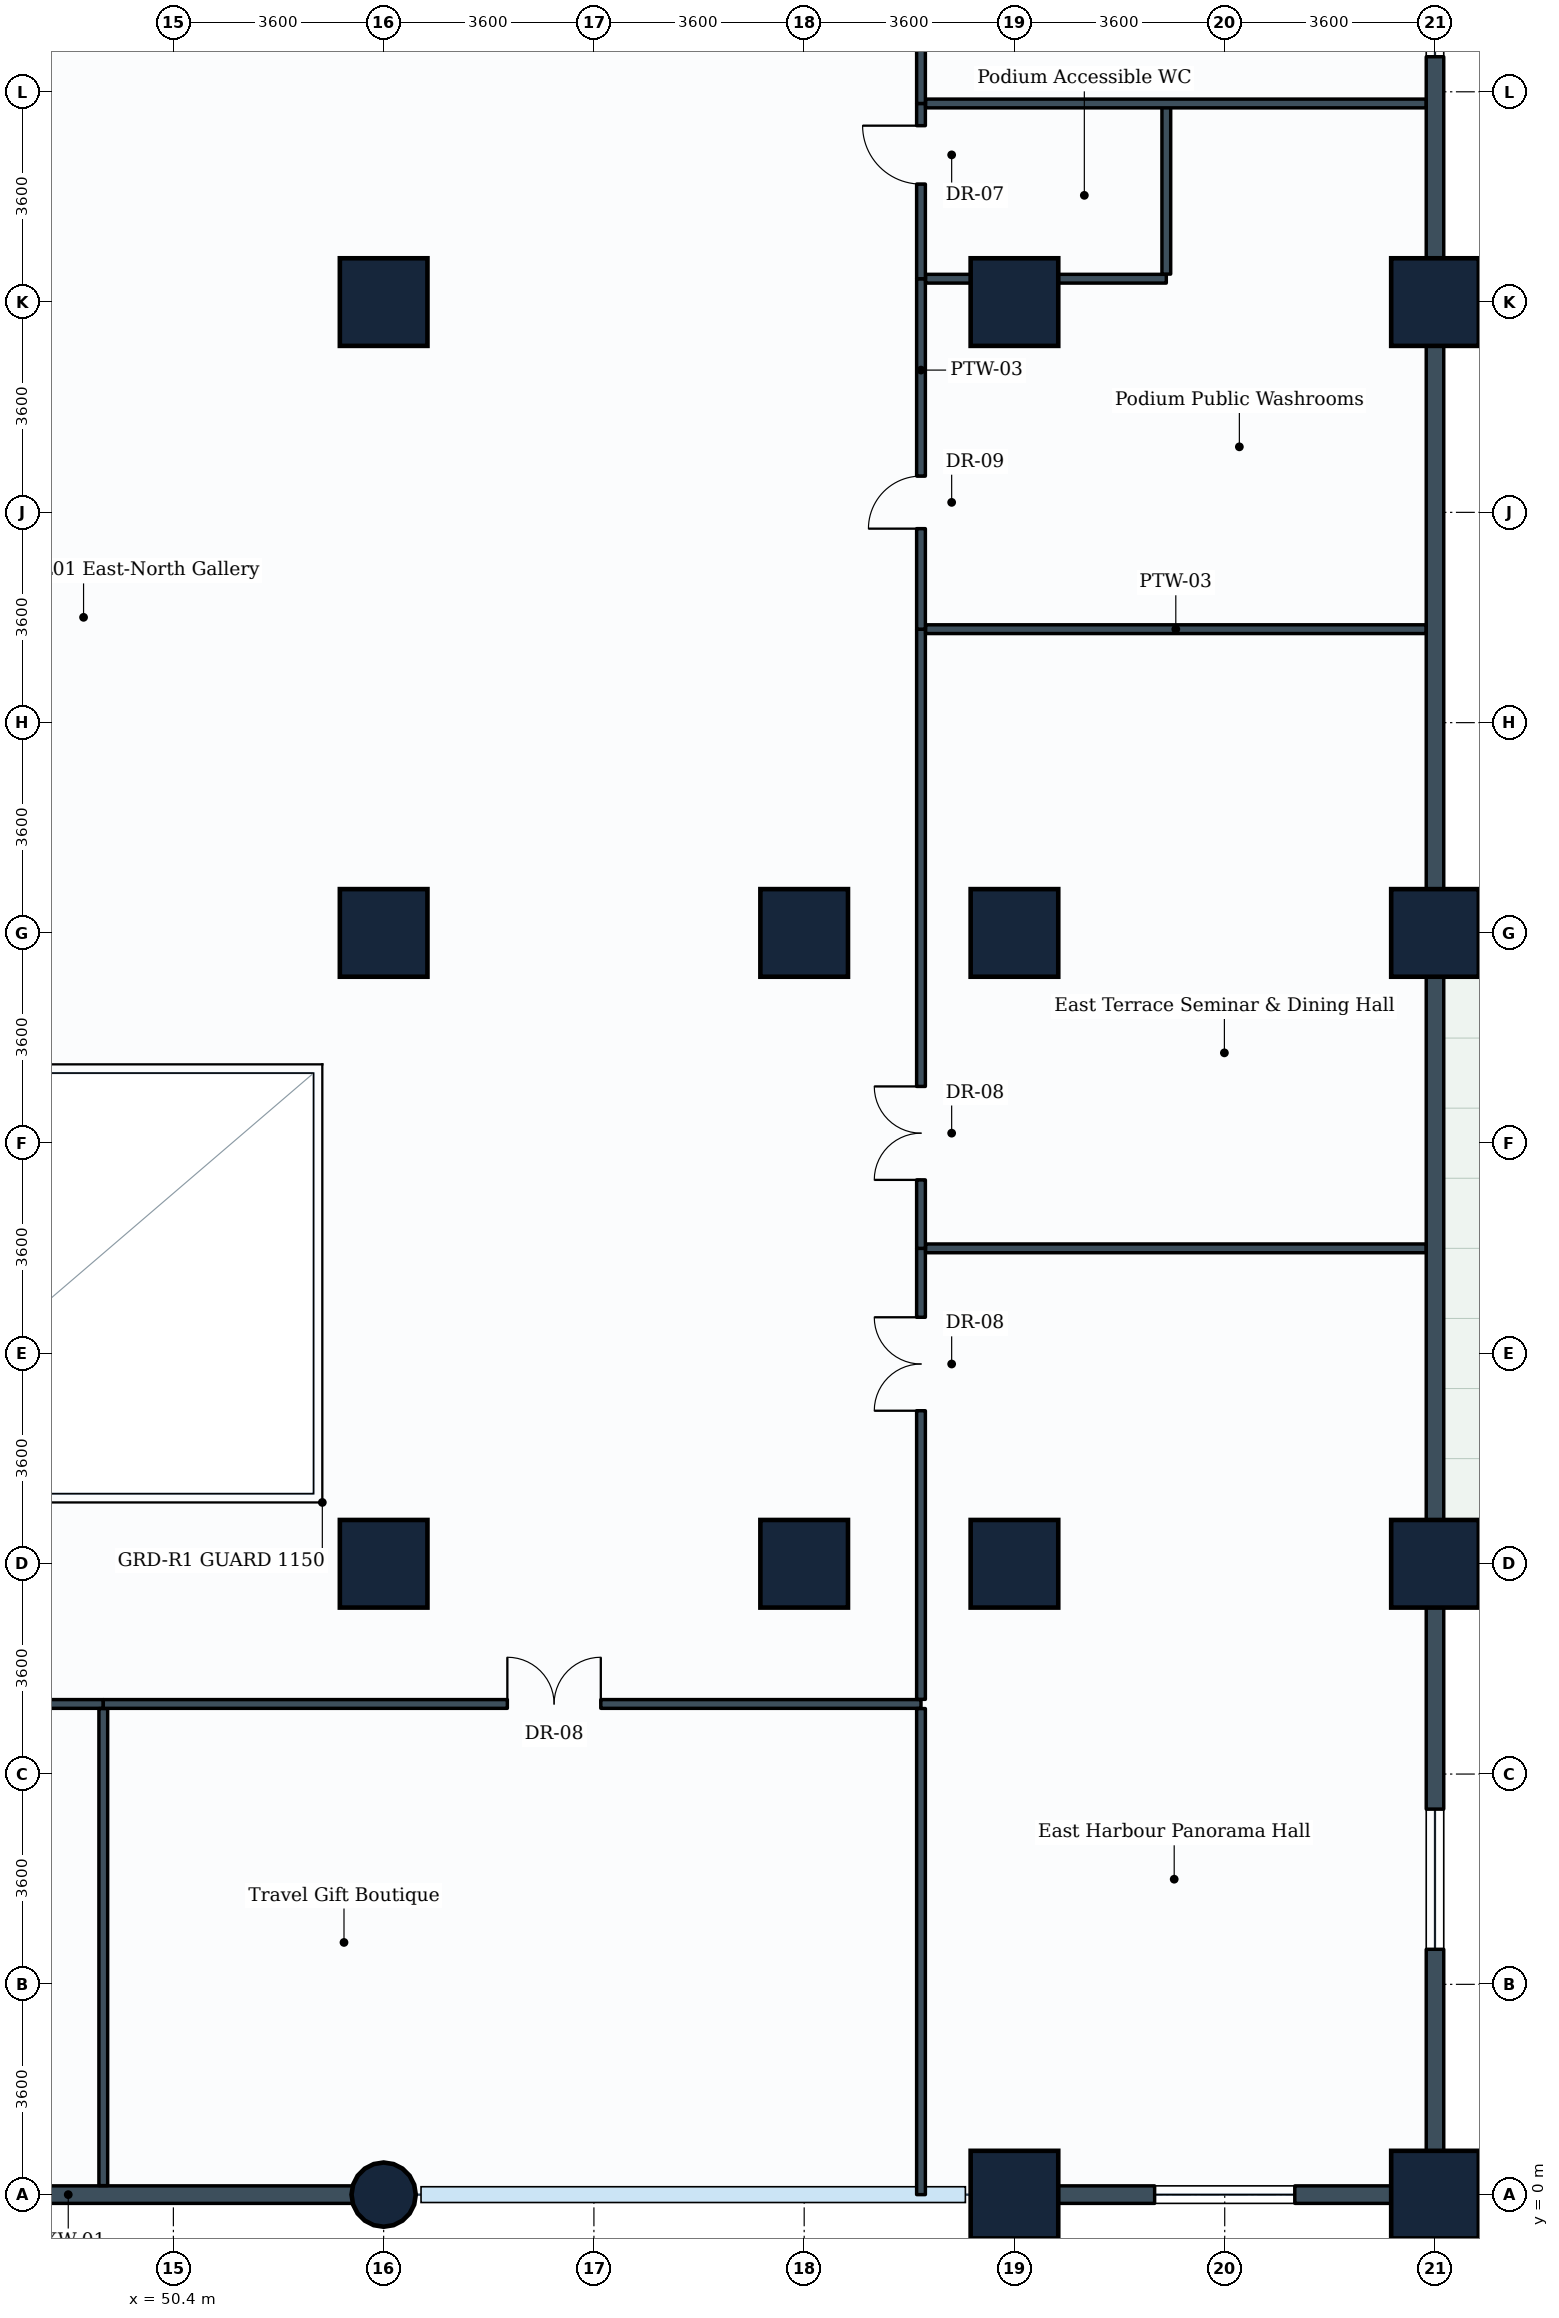
"""IFC4 building model, lengths in metres.
Left out: names, types, materials, properties, quantities, classifications, styles, units other than length and angle.
Written with IfcOpenShell. Run it as: python <this file> out.ifc"""

import sys

from ifc_helpers import new_model, si_unit, direction, frame, frame_2d, origin, origin_2d, place, context, subcontext, project, spatial, rectangle, circle, extrude, element, fill, save


model = new_model("IFC4")
c1 = context("Model", 3, precision=1e-05, world=origin(), true_north=direction((0.0, 1.0)))
c2 = subcontext(c1, "Body", "Model", "MODEL_VIEW")
j1 = project(units=[si_unit("LENGTHUNIT", "METRE"), si_unit("PLANEANGLEUNIT", "RADIAN")], contexts=[c1])
p1 = place(None, origin())
s1 = spatial("IfcSite", under=j1, at=p1, CompositionType="ELEMENT")
p2 = place(p1, origin())
s2 = spatial("IfcBuilding", under=s1, at=p2, CompositionType="ELEMENT")
p3 = place(p2, frame((0.0, 0.0, 5.4)))
s3 = spatial("IfcBuildingStorey", under=s2, at=p3, CompositionType="ELEMENT", Elevation=5.4)
p4 = place(p3, frame((54.0, 0.0, 0.0), z_axis=(0.0, 0.0, 1.0), x_axis=(1.0, 0.0, 0.0)))
e1 = element("IfcColumn", 1, at=p4, inside=s3, PredefinedType="COLUMN", context=c2, shape_type="SweptSolid", body=[
    extrude(circle(Radius=0.55, at=origin_2d()), origin(), (0.0, 0.0, 1.0), 4.8),
])
for number, where, z_axis, x_axis in (
    (2, (54.0, 10.8, 0.0), (0.0, 0.0, 1.0), (1.0, 0.0, 0.0)),
    (3, (54.0, 21.6, 0.0), (0.0, 0.0, 1.0), (1.0, 0.0, 0.0)),
    (4, (54.0, 32.4, 0.0), (0.0, 0.0, 1.0), (1.0, 0.0, 0.0)),
    (5, (61.2, 10.8, 0.0), (0.0, 0.0, 1.0), (1.0, 0.0, 0.0)),
    (6, (61.2, 21.6, 0.0), (0.0, 0.0, 1.0), (1.0, 0.0, 0.0)),
    (7, (64.8, 0.0, 0.0), (0.0, 0.0, 1.0), (1.0, 0.0, 0.0)),
    (8, (64.8, 10.8, 0.0), (0.0, 0.0, 1.0), (1.0, 0.0, 0.0)),
    (9, (64.8, 21.6, 0.0), (0.0, 0.0, 1.0), (1.0, 0.0, 0.0)),
    (10, (64.8, 32.4, 0.0), (0.0, 0.0, 1.0), (1.0, 0.0, 0.0)),
    (11, (72.0, 0.0, 0.0), (0.0, 0.0, 1.0), (1.0, 0.0, 0.0)),
    (12, (72.0, 10.8, 0.0), (0.0, 0.0, 1.0), (1.0, 0.0, 0.0)),
    (13, (72.0, 21.6, 0.0), (0.0, 0.0, 1.0), (1.0, 0.0, 0.0)),
    (14, (72.0, 32.4, 0.0), (0.0, 0.0, 1.0), (1.0, 0.0, 0.0)),
):
    element("IfcColumn", number, at=place(p3, frame(where, z_axis=z_axis, x_axis=x_axis)), inside=s3, PredefinedType="COLUMN", context=c2, shape_type="SweptSolid", body=[
        extrude(rectangle(XDim=1.5, YDim=1.5, at=origin_2d()), origin(), (0.0, 0.0, 1.0), 4.8),
    ])
p5 = place(p3, frame((54.0, 0.0, 0.0), z_axis=(0.0, 0.0, 1.0), x_axis=(-1.0, 0.0, 0.0)))
e15 = element("IfcWall", 15, at=p5, inside=s3, PredefinedType="STANDARD", context=c2, shape_type="SweptSolid", body=[
    extrude(rectangle(XDim=10.8, YDim=0.3, at=frame_2d((5.4, 0.0))), origin(), (0.0, 0.0, 1.0), 3.83),
])
p6 = place(p3, frame((72.0, 0.0, 0.0), z_axis=(0.0, 0.0, 1.0), x_axis=(-1.0, 0.0, 0.0)))
e16 = element("IfcWall", 16, at=p6, inside=s3, PredefinedType="STANDARD", context=c2, shape_type="SweptSolid", body=[
    extrude(rectangle(XDim=7.2, YDim=0.3, at=frame_2d((3.6, 0.0))), origin(), (0.0, 0.0, 1.0), 3.83),
])
p7 = place(p6, frame((2.4, 0.0, 0.85)))
e17 = element("IfcOpeningElement", 17, at=p7, cuts=e16, PredefinedType="OPENING", context=c2, shape_type="SweptSolid", body=[
    extrude(rectangle(XDim=2.4, YDim=1.6, at=frame_2d((1.2, 0.8))), frame((0.0, 0.16, 0.0), z_axis=(0.0, -1.0, 0.0), x_axis=(1.0, 0.0, 0.0)), (0.0, 0.0, 1.0), 0.32),
])
p8 = place(p3, frame((72.0, 10.8, 0.0), z_axis=(0.0, 0.0, 1.0), x_axis=(0.0, -1.0, 0.0)))
e18 = element("IfcWall", 18, at=p8, inside=s3, PredefinedType="STANDARD", context=c2, shape_type="SweptSolid", body=[
    extrude(rectangle(XDim=10.8, YDim=0.3, at=frame_2d((5.4, 0.0))), origin(), (0.0, 0.0, 1.0), 3.83),
])
p9 = place(p8, frame((4.2, 0.0, 0.85)))
e19 = element("IfcOpeningElement", 19, at=p9, cuts=e18, PredefinedType="OPENING", context=c2, shape_type="SweptSolid", body=[
    extrude(rectangle(XDim=2.4, YDim=1.6, at=frame_2d((1.2, 0.8))), frame((0.0, 0.16, 0.0), z_axis=(0.0, -1.0, 0.0), x_axis=(1.0, 0.0, 0.0)), (0.0, 0.0, 1.0), 0.32),
])
p10 = place(p3, frame((72.0, 21.6, 0.0), z_axis=(0.0, 0.0, 1.0), x_axis=(0.0, -1.0, 0.0)))
e20 = element("IfcWall", 20, at=p10, inside=s3, PredefinedType="STANDARD", context=c2, shape_type="SweptSolid", body=[
    extrude(rectangle(XDim=10.8, YDim=0.3, at=frame_2d((5.4, 0.0))), origin(), (0.0, 0.0, 1.0), 3.83),
])
p11 = place(p3, frame((72.0, 32.4, 0.0), z_axis=(0.0, 0.0, 1.0), x_axis=(0.0, -1.0, 0.0)))
e21 = element("IfcWall", 21, at=p11, inside=s3, PredefinedType="STANDARD", context=c2, shape_type="SweptSolid", body=[
    extrude(rectangle(XDim=10.8, YDim=0.3, at=frame_2d((5.4, 0.0))), origin(), (0.0, 0.0, 1.0), 3.83),
])
p12 = place(p3, frame((72.0, 43.2, 0.0), z_axis=(0.0, 0.0, 1.0), x_axis=(0.0, -1.0, 0.0)))
e22 = element("IfcWall", 22, at=p12, inside=s3, PredefinedType="STANDARD", context=c2, shape_type="SweptSolid", body=[
    extrude(rectangle(XDim=10.8, YDim=0.3, at=frame_2d((5.4, 0.0))), origin(), (0.0, 0.0, 1.0), 3.83),
])
p13 = place(p12, frame((4.2, 0.0, 0.85)))
e23 = element("IfcOpeningElement", 23, at=p13, cuts=e22, PredefinedType="OPENING", context=c2, shape_type="SweptSolid", body=[
    extrude(rectangle(XDim=2.4, YDim=1.6, at=frame_2d((1.2, 0.8))), frame((0.0, 0.16, 0.0), z_axis=(0.0, -1.0, 0.0), x_axis=(1.0, 0.0, 0.0)), (0.0, 0.0, 1.0), 0.32),
])
p14 = place(p3, frame((36.0, 8.4, 0.0), z_axis=(0.0, 0.0, 1.0), x_axis=(1.0, 0.0, 0.0)))
e24 = element("IfcWall", 24, at=p14, inside=s3, PredefinedType="PARTITIONING", context=c2, shape_type="SweptSolid", body=[
    extrude(rectangle(XDim=13.2, YDim=0.15, at=frame_2d((6.6, 0.0))), origin(), (0.0, 0.0, 1.0), 3.83),
])
p15 = place(p14, frame((3.409, 0.0, 0.0)))
e25 = element("IfcOpeningElement", 25, at=p15, cuts=e24, PredefinedType="OPENING", context=c2, shape_type="SweptSolid", body=[
    extrude(rectangle(XDim=1.6, YDim=2.2, at=frame_2d((0.8, 1.1))), frame((0.0, 0.085, 0.0), z_axis=(0.0, -1.0, 0.0), x_axis=(1.0, 0.0, 0.0)), (0.0, 0.0, 1.0), 0.17),
])
p16 = place(p3, frame((49.2, 0.154, 0.0), z_axis=(0.0, 0.0, 1.0), x_axis=(0.0, 1.0, 0.0)))
e26 = element("IfcWall", 26, at=p16, inside=s3, PredefinedType="PARTITIONING", context=c2, shape_type="SweptSolid", body=[
    extrude(rectangle(XDim=8.167, YDim=0.15, at=frame_2d((4.083, 0.0))), origin(), (0.0, 0.0, 1.0), 4.485),
])
p17 = place(p3, frame((49.2, 8.4, 0.0), z_axis=(0.0, 0.0, 1.0), x_axis=(1.0, 0.0, 0.0)))
e27 = element("IfcWall", 27, at=p17, inside=s3, PredefinedType="PARTITIONING", context=c2, shape_type="SweptSolid", body=[
    extrude(rectangle(XDim=14.0, YDim=0.15, at=frame_2d((7.0, 0.0))), origin(), (0.0, 0.0, 1.0), 3.83),
])
p18 = place(p17, frame((6.918, 0.0, 0.0)))
e28 = element("IfcOpeningElement", 28, at=p18, cuts=e27, PredefinedType="OPENING", context=c2, shape_type="SweptSolid", body=[
    extrude(rectangle(XDim=1.6, YDim=2.2, at=frame_2d((0.8, 1.1))), frame((0.0, 0.085, 0.0), z_axis=(0.0, -1.0, 0.0), x_axis=(1.0, 0.0, 0.0)), (0.0, 0.0, 1.0), 0.17),
])
p19 = place(p3, frame((63.2, 0.0, 0.0), z_axis=(0.0, 0.0, 1.0), x_axis=(0.0, 1.0, 0.0)))
e29 = element("IfcWall", 29, at=p19, inside=s3, PredefinedType="PARTITIONING", context=c2, shape_type="SweptSolid", body=[
    extrude(rectangle(XDim=8.321, YDim=0.15, at=frame_2d((4.161, 0.0))), origin(), (0.0, 0.0, 1.0), 3.83),
])
p20 = place(p3, frame((63.2, 8.479, 0.0), z_axis=(0.0, 0.0, 1.0), x_axis=(0.0, 1.0, 0.0)))
e30 = element("IfcWall", 30, at=p20, inside=s3, PredefinedType="PARTITIONING", context=c2, shape_type="SweptSolid", body=[
    extrude(rectangle(XDim=7.721, YDim=0.15, at=frame_2d((3.86, 0.0))), origin(), (0.0, 0.0, 1.0), 3.83),
])
p21 = place(p20, frame((4.941, 0.0, 0.0)))
e31 = element("IfcOpeningElement", 31, at=p21, cuts=e30, PredefinedType="OPENING", context=c2, shape_type="SweptSolid", body=[
    extrude(rectangle(XDim=1.6, YDim=2.2, at=frame_2d((0.8, 1.1))), frame((0.0, 0.085, 0.0), z_axis=(0.0, -1.0, 0.0), x_axis=(1.0, 0.0, 0.0)), (0.0, 0.0, 1.0), 0.17),
])
p22 = place(p3, frame((63.279, 16.2, 0.0), z_axis=(0.0, 0.0, 1.0), x_axis=(1.0, 0.0, 0.0)))
e32 = element("IfcWall", 32, at=p22, inside=s3, PredefinedType="PARTITIONING", context=c2, shape_type="SweptSolid", body=[
    extrude(rectangle(XDim=8.567, YDim=0.15, at=frame_2d((4.283, 0.0))), origin(), (0.0, 0.0, 1.0), 3.83),
])
p23 = place(p3, frame((63.2, 16.2, 0.0), z_axis=(0.0, 0.0, 1.0), x_axis=(0.0, 1.0, 0.0)))
e33 = element("IfcWall", 33, at=p23, inside=s3, PredefinedType="PARTITIONING", context=c2, shape_type="SweptSolid", body=[
    extrude(rectangle(XDim=10.6, YDim=0.15, at=frame_2d((5.3, 0.0))), origin(), (0.0, 0.0, 1.0), 3.83),
])
p24 = place(p23, frame((1.172, 0.0, 0.0)))
e34 = element("IfcOpeningElement", 34, at=p24, cuts=e33, PredefinedType="OPENING", context=c2, shape_type="SweptSolid", body=[
    extrude(rectangle(XDim=1.6, YDim=2.2, at=frame_2d((0.8, 1.1))), frame((0.0, 0.085, 0.0), z_axis=(0.0, -1.0, 0.0), x_axis=(1.0, 0.0, 0.0)), (0.0, 0.0, 1.0), 0.17),
])
p25 = place(p3, frame((63.279, 26.8, 0.0), z_axis=(0.0, 0.0, 1.0), x_axis=(1.0, 0.0, 0.0)))
e35 = element("IfcWall", 35, at=p25, inside=s3, PredefinedType="PARTITIONING", context=c2, shape_type="SweptSolid", body=[
    extrude(rectangle(XDim=8.567, YDim=0.15, at=frame_2d((4.283, 0.0))), origin(), (0.0, 0.0, 1.0), 3.83),
])
p26 = place(p3, frame((63.2, 26.8, 0.0), z_axis=(0.0, 0.0, 1.0), x_axis=(0.0, 1.0, 0.0)))
e36 = element("IfcWall", 36, at=p26, inside=s3, PredefinedType="PARTITIONING", context=c2, shape_type="SweptSolid", body=[
    extrude(rectangle(XDim=6.0, YDim=0.15, at=frame_2d((3.0, 0.0))), origin(), (0.0, 0.0, 1.0), 3.83),
])
p27 = place(p26, frame((1.721, 0.0, 0.0)))
e37 = element("IfcOpeningElement", 37, at=p27, cuts=e36, PredefinedType="OPENING", context=c2, shape_type="SweptSolid", body=[
    extrude(rectangle(XDim=0.9, YDim=2.1, at=frame_2d((0.45, 1.05))), frame((0.0, 0.085, 0.0), z_axis=(0.0, -1.0, 0.0), x_axis=(1.0, 0.0, 0.0)), (0.0, 0.0, 1.0), 0.17),
])
p28 = place(p3, frame((63.279, 32.8, 0.0), z_axis=(0.0, 0.0, 1.0), x_axis=(1.0, 0.0, 0.0)))
e38 = element("IfcWall", 38, at=p28, inside=s3, PredefinedType="PARTITIONING", context=c2, shape_type="SweptSolid", body=[
    extrude(rectangle(XDim=4.121, YDim=0.15, at=frame_2d((2.061, 0.0))), origin(), (0.0, 0.0, 1.0), 3.83),
])
p29 = place(p3, frame((67.4, 32.879, 0.0), z_axis=(0.0, 0.0, 1.0), x_axis=(0.0, 1.0, 0.0)))
e39 = element("IfcWall", 39, at=p29, inside=s3, PredefinedType="PARTITIONING", context=c2, shape_type="SweptSolid", body=[
    extrude(rectangle(XDim=2.921, YDim=0.15, at=frame_2d((1.46, 0.0))), origin(), (0.0, 0.0, 1.0), 4.485),
])
p30 = place(p3, frame((63.2, 32.8, 0.0), z_axis=(0.0, 0.0, 1.0), x_axis=(0.0, 1.0, 0.0)))
e40 = element("IfcWall", 40, at=p30, inside=s3, PredefinedType="PARTITIONING", context=c2, shape_type="SweptSolid", body=[
    extrude(rectangle(XDim=3.0, YDim=0.15, at=frame_2d((1.5, 0.0))), origin(), (0.0, 0.0, 1.0), 4.485),
])
p31 = place(p30, frame((1.62, 0.0, 0.0)))
e41 = element("IfcOpeningElement", 41, at=p31, cuts=e40, PredefinedType="OPENING", context=c2, shape_type="SweptSolid", body=[
    extrude(rectangle(XDim=1.0, YDim=2.1, at=frame_2d((0.5, 1.05))), frame((0.0, 0.085, 0.0), z_axis=(0.0, -1.0, 0.0), x_axis=(1.0, 0.0, 0.0)), (0.0, 0.0, 1.0), 0.17),
])
p32 = place(p3, frame((63.279, 35.8, 0.0), z_axis=(0.0, 0.0, 1.0), x_axis=(1.0, 0.0, 0.0)))
e42 = element("IfcWall", 42, at=p32, inside=s3, PredefinedType="PARTITIONING", context=c2, shape_type="SweptSolid", body=[
    extrude(rectangle(XDim=8.567, YDim=0.15, at=frame_2d((4.283, 0.0))), origin(), (0.0, 0.0, 1.0), 3.83),
])
p33 = place(p3, frame((63.2, 35.8, 0.0), z_axis=(0.0, 0.0, 1.0), x_axis=(0.0, 1.0, 0.0)))
e43 = element("IfcWall", 43, at=p33, inside=s3, PredefinedType="PARTITIONING", context=c2, shape_type="SweptSolid", body=[
    extrude(rectangle(XDim=3.721, YDim=0.15, at=frame_2d((1.86, 0.0))), origin(), (0.0, 0.0, 1.0), 4.485),
])
p34 = place(p33, frame((1.4, 0.0, 0.0)))
e44 = element("IfcOpeningElement", 44, at=p34, cuts=e43, PredefinedType="OPENING", context=c2, shape_type="SweptSolid", body=[
    extrude(rectangle(XDim=1.0, YDim=2.1, at=frame_2d((0.5, 1.05))), frame((0.0, 0.085, 0.0), z_axis=(0.0, -1.0, 0.0), x_axis=(1.0, 0.0, 0.0)), (0.0, 0.0, 1.0), 0.17),
])
p35 = place(p7, origin())
e45 = element("IfcWindow", 45, at=p35, inside=s3, PartitioningType="SINGLE_PANEL", PredefinedType="WINDOW", context=c2, shape_type="SweptSolid", body=[
    extrude(rectangle(XDim=2.4, YDim=1.6, at=frame_2d((1.2, 0.8))), frame((0.0, 0.03, 0.0), z_axis=(0.0, -1.0, 0.0), x_axis=(1.0, 0.0, 0.0)), (0.0, 0.0, 1.0), 0.06),
])
fill(e17, e45)
p36 = place(p9, origin())
e46 = element("IfcWindow", 46, at=p36, inside=s3, PartitioningType="SINGLE_PANEL", PredefinedType="WINDOW", context=c2, shape_type="SweptSolid", body=[
    extrude(rectangle(XDim=2.4, YDim=1.6, at=frame_2d((1.2, 0.8))), frame((0.0, 0.03, 0.0), z_axis=(0.0, -1.0, 0.0), x_axis=(1.0, 0.0, 0.0)), (0.0, 0.0, 1.0), 0.06),
])
fill(e19, e46)
p37 = place(p13, origin())
e47 = element("IfcWindow", 47, at=p37, inside=s3, PartitioningType="SINGLE_PANEL", PredefinedType="WINDOW", context=c2, shape_type="SweptSolid", body=[
    extrude(rectangle(XDim=2.4, YDim=1.6, at=frame_2d((1.2, 0.8))), frame((0.0, 0.03, 0.0), z_axis=(0.0, -1.0, 0.0), x_axis=(1.0, 0.0, 0.0)), (0.0, 0.0, 1.0), 0.06),
])
fill(e23, e47)
p38 = place(p18, origin())
e48 = element("IfcDoor", 48, at=p38, inside=s3, OperationType="DOUBLE_DOOR_SINGLE_SWING", PredefinedType="DOOR", context=c2, shape_type="SweptSolid", body=[
    extrude(rectangle(XDim=1.6, YDim=2.2, at=frame_2d((0.8, 1.1))), frame((0.0, 0.025, 0.0), z_axis=(0.0, -1.0, 0.0), x_axis=(1.0, 0.0, 0.0)), (0.0, 0.0, 1.0), 0.05),
])
fill(e28, e48)
p39 = place(p21, origin())
e49 = element("IfcDoor", 49, at=p39, inside=s3, OperationType="DOUBLE_DOOR_SINGLE_SWING", PredefinedType="DOOR", context=c2, shape_type="SweptSolid", body=[
    extrude(rectangle(XDim=1.6, YDim=2.2, at=frame_2d((0.8, 1.1))), frame((0.0, 0.025, 0.0), z_axis=(0.0, -1.0, 0.0), x_axis=(1.0, 0.0, 0.0)), (0.0, 0.0, 1.0), 0.05),
])
fill(e31, e49)
p40 = place(p24, origin())
e50 = element("IfcDoor", 50, at=p40, inside=s3, OperationType="DOUBLE_DOOR_SINGLE_SWING", PredefinedType="DOOR", context=c2, shape_type="SweptSolid", body=[
    extrude(rectangle(XDim=1.6, YDim=2.2, at=frame_2d((0.8, 1.1))), frame((0.0, 0.025, 0.0), z_axis=(0.0, -1.0, 0.0), x_axis=(1.0, 0.0, 0.0)), (0.0, 0.0, 1.0), 0.05),
])
fill(e34, e50)
p41 = place(p27, origin())
e51 = element("IfcDoor", 51, at=p41, inside=s3, OperationType="SINGLE_SWING_LEFT", PredefinedType="DOOR", context=c2, shape_type="SweptSolid", body=[
    extrude(rectangle(XDim=0.9, YDim=2.1, at=frame_2d((0.45, 1.05))), frame((0.0, 0.025, 0.0), z_axis=(0.0, -1.0, 0.0), x_axis=(1.0, 0.0, 0.0)), (0.0, 0.0, 1.0), 0.05),
])
fill(e37, e51)
p42 = place(p31, origin())
e52 = element("IfcDoor", 52, at=p42, inside=s3, OperationType="SINGLE_SWING_RIGHT", PredefinedType="DOOR", context=c2, shape_type="SweptSolid", body=[
    extrude(rectangle(XDim=1.0, YDim=2.1, at=frame_2d((0.5, 1.05))), frame((0.0, 0.025, 0.0), z_axis=(0.0, -1.0, 0.0), x_axis=(1.0, 0.0, 0.0)), (0.0, 0.0, 1.0), 0.05),
])
fill(e41, e52)
save(model, sys.argv[1])
